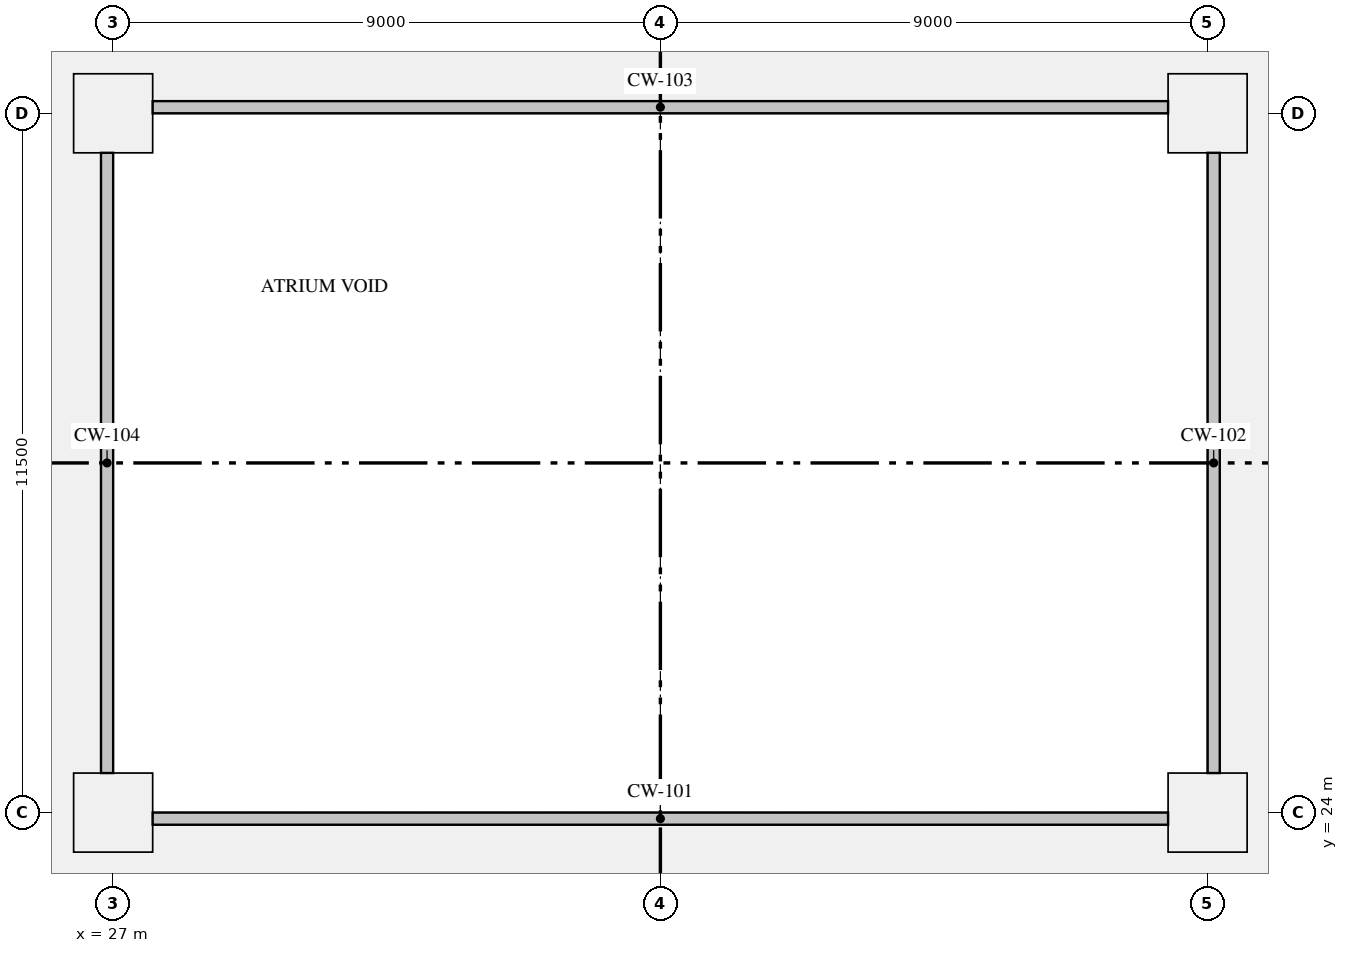
"""IFC4 building model, lengths in metres.
Left out: names, types, materials, properties, quantities, classifications, styles, units other than length and angle.
Written with IfcOpenShell. Run it as: python <this file> out.ifc"""

import sys

from ifc_helpers import new_model, si_unit, direction, frame, origin, origin_2d, place, context, subcontext, project, spatial, rectangle, extrude, element, save


model = new_model("IFC4")
c1 = context("Model", 3, precision=1e-05, world=origin(), true_north=direction((0.0, 1.0)))
c2 = subcontext(c1, "Body", "Model", "MODEL_VIEW")
j1 = project(units=[si_unit("LENGTHUNIT", "METRE"), si_unit("PLANEANGLEUNIT", "RADIAN")], contexts=[c1])
p1 = place(None, origin())
s1 = spatial("IfcSite", under=j1, at=p1, CompositionType="ELEMENT")
p2 = place(p1, origin())
s2 = spatial("IfcBuilding", under=s1, at=p2, CompositionType="ELEMENT")
p3 = place(p2, frame((0.0, 0.0, 130.8)))
s3 = spatial("IfcBuildingStorey", under=s2, at=p3, CompositionType="ELEMENT", Elevation=130.8)
for number, where, z_axis, x_axis in (
    (1, (27.0, 24.0, 0.0), (0.0, 0.0, 1.0), (1.0, 0.0, 0.0)),
    (2, (45.0, 24.0, 0.0), (0.0, 0.0, 1.0), (1.0, 0.0, 0.0)),
    (3, (27.0, 35.5, 0.0), (0.0, 0.0, 1.0), (1.0, 0.0, 0.0)),
    (4, (45.0, 35.5, 0.0), (0.0, 0.0, 1.0), (1.0, 0.0, 0.0)),
):
    element("IfcColumn", number, at=place(p3, frame(where, z_axis=z_axis, x_axis=x_axis)), inside=s3, PredefinedType="COLUMN", context=c2, shape_type="SweptSolid", body=[
        extrude(rectangle(XDim=1.3, YDim=1.3, at=origin_2d()), origin(), (0.0, 0.0, 1.0), 6.3),
    ])
save(model, sys.argv[1])
